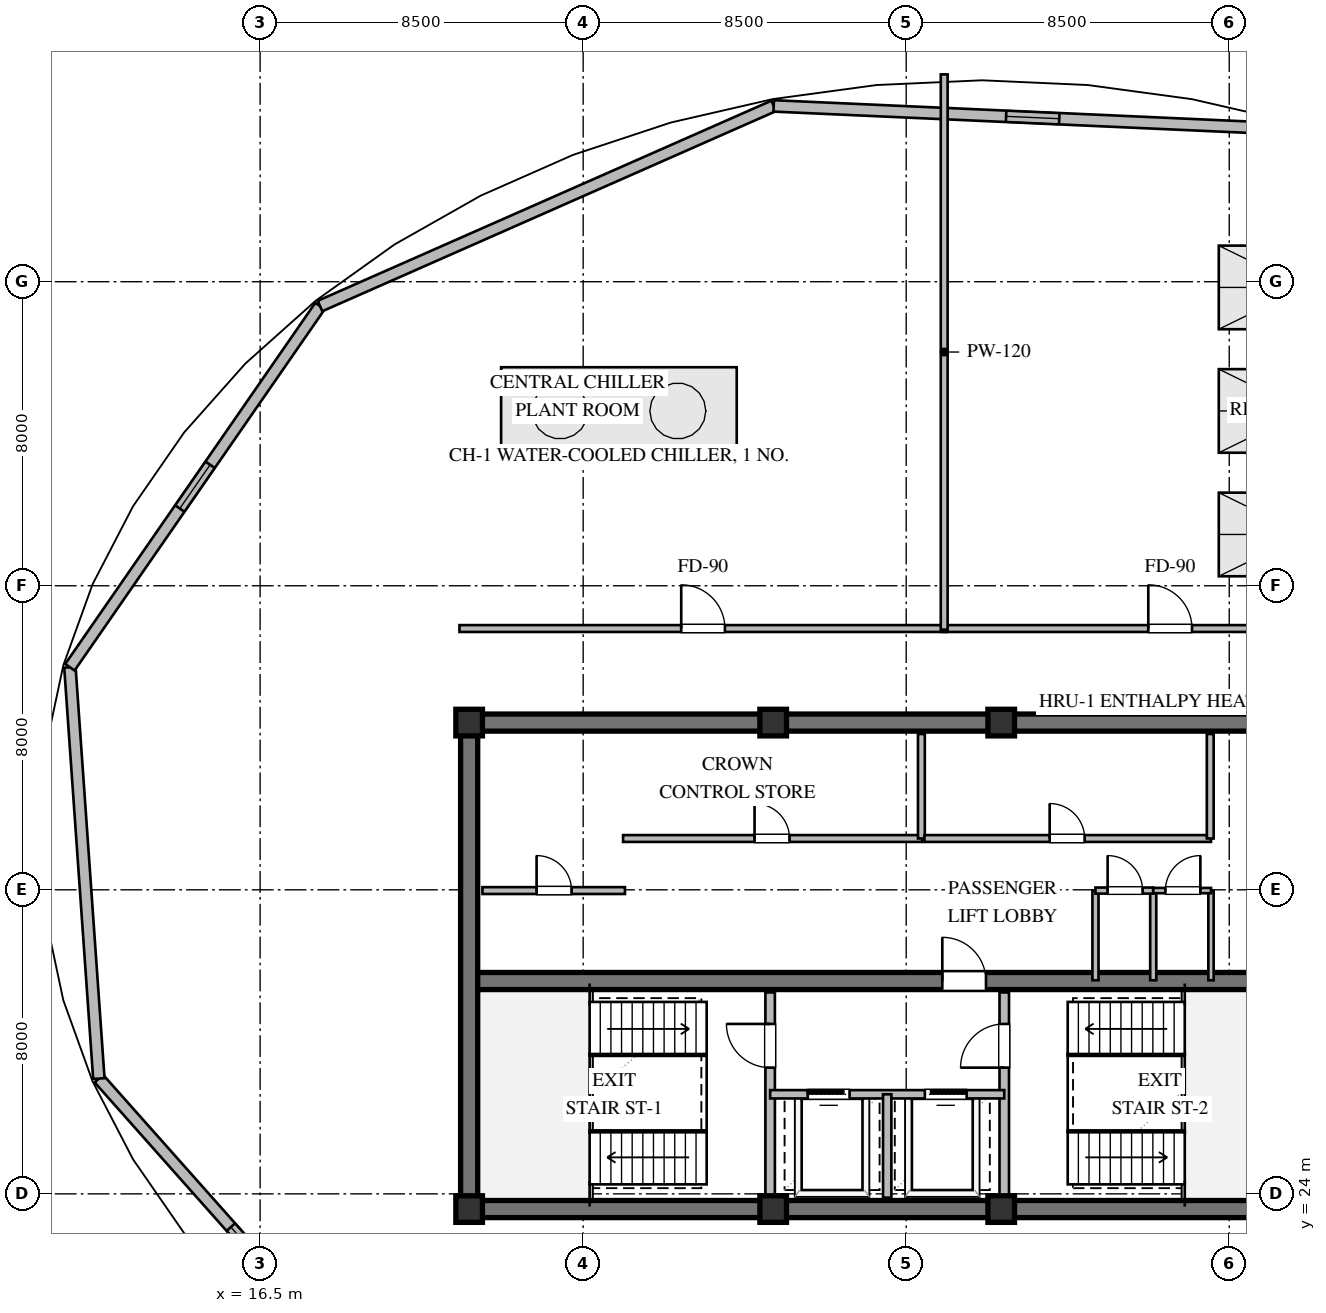
"""IFC4 building model, lengths in metres.
Left out: names, types, materials, properties, quantities, classifications, styles, units other than length and angle.
Written with IfcOpenShell. Run it as: python <this file> out.ifc"""

import sys

from ifc_helpers import new_model, si_unit, direction, frame, frame_2d, origin, origin_2d, place, context, subcontext, project, spatial, rectangle, extrude, element, fill, save


model = new_model("IFC4")
c1 = context("Model", 3, precision=1e-05, world=origin(), true_north=direction((0.0, 1.0)))
c2 = subcontext(c1, "Body", "Model", "MODEL_VIEW")
j1 = project(units=[si_unit("LENGTHUNIT", "METRE"), si_unit("PLANEANGLEUNIT", "RADIAN")], contexts=[c1])
p1 = place(None, origin())
s1 = spatial("IfcSite", under=j1, at=p1, CompositionType="ELEMENT")
p2 = place(p1, origin())
s2 = spatial("IfcBuilding", under=s1, at=p2, CompositionType="ELEMENT")
p3 = place(p2, frame((0.0, 0.0, 300.8)))
s3 = spatial("IfcBuildingStorey", under=s2, at=p3, CompositionType="ELEMENT", Elevation=300.8)
for number, where, z_axis, x_axis in (
    (1, (21.775, 23.6, 0.0), (0.0, 0.0, 1.0), (1.0, 0.0, 0.0)),
    (2, (21.775, 36.4, 0.0), (0.0, 0.0, 1.0), (1.0, 0.0, 0.0)),
):
    element("IfcWall", number, at=place(p3, frame(where, z_axis=z_axis, x_axis=x_axis)), inside=s3, PredefinedType="SHEAR", context=c2, shape_type="SweptSolid", body=[
        extrude(rectangle(XDim=22.45, YDim=0.45, at=frame_2d((11.225, 0.0))), origin(), (0.0, 0.0, 1.0), 3.72),
    ])
p4 = place(p3, frame((22.0, 23.825, 0.0), z_axis=(0.0, 0.0, 1.0), x_axis=(0.0, 1.0, 0.0)))
e3 = element("IfcWall", 3, at=p4, inside=s3, PredefinedType="SHEAR", context=c2, shape_type="SweptSolid", body=[
    extrude(rectangle(XDim=12.35, YDim=0.45, at=frame_2d((6.175, 0.0))), origin(), (0.0, 0.0, 1.0), 3.72),
])
p5 = place(p3, frame((22.225, 29.6, 0.0), z_axis=(0.0, 0.0, 1.0), x_axis=(1.0, 0.0, 0.0)))
e4 = element("IfcWall", 4, at=p5, inside=s3, PredefinedType="SHEAR", context=c2, shape_type="SweptSolid", body=[
    extrude(rectangle(XDim=21.55, YDim=0.45, at=frame_2d((10.775, 0.0))), origin(), (0.0, 0.0, 1.0), 3.72),
])
p6 = place(p5, frame((12.225, 0.0, 0.0)))
e5 = element("IfcOpeningElement", 5, at=p6, cuts=e4, PredefinedType="OPENING", context=c2, shape_type="SweptSolid", body=[
    extrude(rectangle(XDim=1.15, YDim=2.1, at=frame_2d((0.575, 1.05))), frame((0.0, 0.235, 0.0), z_axis=(0.0, -1.0, 0.0), x_axis=(1.0, 0.0, 0.0)), (0.0, 0.0, 1.0), 0.47),
])
for number, where, z_axis, x_axis in (
    (6, (22.0, 23.6, 0.0), (0.0, 0.0, 1.0), (1.0, 0.0, 0.0)),
    (7, (30.0, 23.6, 0.0), (0.0, 0.0, 1.0), (1.0, 0.0, 0.0)),
    (8, (36.0, 23.6, 0.0), (0.0, 0.0, 1.0), (1.0, 0.0, 0.0)),
    (9, (36.0, 36.4, 0.0), (0.0, 0.0, 1.0), (1.0, 0.0, 0.0)),
    (10, (30.0, 36.4, 0.0), (0.0, 0.0, 1.0), (1.0, 0.0, 0.0)),
    (11, (22.0, 36.4, 0.0), (0.0, 0.0, 1.0), (1.0, 0.0, 0.0)),
):
    element("IfcColumn", number, at=place(p3, frame(where, z_axis=z_axis, x_axis=x_axis)), inside=s3, PredefinedType="COLUMN", context=c2, shape_type="SweptSolid", body=[
        extrude(rectangle(XDim=0.7, YDim=0.7, at=origin_2d()), origin(), (0.0, 0.0, 1.0), 4.0),
    ])
p7 = place(p3, frame((20.134, 18.172, 0.0), z_axis=(0.0, 0.0, 1.0), x_axis=(-0.664394513906, 0.747382050822, 0.0)))
e12 = element("IfcWall", 12, at=p7, inside=s3, PredefinedType="STANDARD", context=c2, shape_type="SweptSolid", body=[
    extrude(rectangle(XDim=11.856, YDim=0.3, at=frame_2d((5.928, 0.0))), origin(), (0.0, 0.0, 1.0), 3.72),
])
p8 = place(p7, frame((5.228, 0.0, 1.2)))
e13 = element("IfcOpeningElement", 13, at=p8, cuts=e12, PredefinedType="OPENING", context=c2, shape_type="SweptSolid", body=[
    extrude(rectangle(XDim=1.4, YDim=1.2, at=frame_2d((0.7, 0.6))), frame((0.0, 0.16, 0.0), z_axis=(0.0, -1.0, 0.0), x_axis=(1.0, 0.0, 0.0)), (0.0, 0.0, 1.0), 0.32),
])
p9 = place(p3, frame((12.257, 27.033, 0.0), z_axis=(0.0, 0.0, 1.0), x_axis=(-0.070228374331, 0.99753093959, 0.0)))
e14 = element("IfcWall", 14, at=p9, inside=s3, PredefinedType="STANDARD", context=c2, shape_type="SweptSolid", body=[
    extrude(rectangle(XDim=10.85, YDim=0.3, at=frame_2d((5.425, 0.0))), origin(), (0.0, 0.0, 1.0), 3.72),
])
p10 = place(p3, frame((11.495, 37.856, 0.0), z_axis=(0.0, 0.0, 1.0), x_axis=(0.569269280193, 0.822151133691, 0.0)))
e15 = element("IfcWall", 15, at=p10, inside=s3, PredefinedType="STANDARD", context=c2, shape_type="SweptSolid", body=[
    extrude(rectangle(XDim=11.56, YDim=0.3, at=frame_2d((5.78, 0.0))), origin(), (0.0, 0.0, 1.0), 3.72),
])
p11 = place(p10, frame((5.08, 0.0, 1.2)))
e16 = element("IfcOpeningElement", 16, at=p11, cuts=e15, PredefinedType="OPENING", context=c2, shape_type="SweptSolid", body=[
    extrude(rectangle(XDim=1.4, YDim=1.2, at=frame_2d((0.7, 0.6))), frame((0.0, 0.16, 0.0), z_axis=(0.0, -1.0, 0.0), x_axis=(1.0, 0.0, 0.0)), (0.0, 0.0, 1.0), 0.32),
])
p12 = place(p3, frame((18.076, 47.36, 0.0), z_axis=(0.0, 0.0, 1.0), x_axis=(0.914943001047, 0.40358308294, 0.0)))
e17 = element("IfcWall", 17, at=p12, inside=s3, PredefinedType="STANDARD", context=c2, shape_type="SweptSolid", body=[
    extrude(rectangle(XDim=13.048, YDim=0.3, at=frame_2d((6.524, 0.0))), origin(), (0.0, 0.0, 1.0), 3.72),
])
p13 = place(p3, frame((30.014, 52.626, 0.0), z_axis=(0.0, 0.0, 1.0), x_axis=(0.998996211569, -0.04479474602, 0.0)))
e18 = element("IfcWall", 18, at=p13, inside=s3, PredefinedType="STANDARD", context=c2, shape_type="SweptSolid", body=[
    extrude(rectangle(XDim=13.642, YDim=0.3, at=frame_2d((6.821, 0.0))), origin(), (0.0, 0.0, 1.0), 3.72),
])
p14 = place(p13, frame((6.121, 0.0, 1.2)))
e19 = element("IfcOpeningElement", 19, at=p14, cuts=e18, PredefinedType="OPENING", context=c2, shape_type="SweptSolid", body=[
    extrude(rectangle(XDim=1.4, YDim=1.2, at=frame_2d((0.7, 0.6))), frame((0.0, 0.16, 0.0), z_axis=(0.0, -1.0, 0.0), x_axis=(1.0, 0.0, 0.0)), (0.0, 0.0, 1.0), 0.32),
])
p15 = place(p3, frame((29.92, 23.9, 0.0), z_axis=(0.0, 0.0, 1.0), x_axis=(0.0, 1.0, 0.0)))
e20 = element("IfcWall", 20, at=p15, inside=s3, PredefinedType="SOLIDWALL", context=c2, shape_type="SweptSolid", body=[
    extrude(rectangle(XDim=5.4, YDim=0.25, at=frame_2d((2.7, 0.0))), origin(), (0.0, 0.0, 1.0), 3.72),
])
p16 = place(p15, frame((3.421, 0.0, 0.0)))
e21 = element("IfcOpeningElement", 21, at=p16, cuts=e20, PredefinedType="OPENING", context=c2, shape_type="SweptSolid", body=[
    extrude(rectangle(XDim=1.15, YDim=2.1, at=frame_2d((0.575, 1.05))), frame((0.0, 0.135, 0.0), z_axis=(0.0, -1.0, 0.0), x_axis=(1.0, 0.0, 0.0)), (0.0, 0.0, 1.0), 0.27),
])
p17 = place(p3, frame((36.08, 23.9, 0.0), z_axis=(0.0, 0.0, 1.0), x_axis=(0.0, 1.0, 0.0)))
e22 = element("IfcWall", 22, at=p17, inside=s3, PredefinedType="SOLIDWALL", context=c2, shape_type="SweptSolid", body=[
    extrude(rectangle(XDim=5.4, YDim=0.25, at=frame_2d((2.7, 0.0))), origin(), (0.0, 0.0, 1.0), 3.72),
])
p18 = place(p17, frame((3.421, 0.0, 0.0)))
e23 = element("IfcOpeningElement", 23, at=p18, cuts=e22, PredefinedType="OPENING", context=c2, shape_type="SweptSolid", body=[
    extrude(rectangle(XDim=1.15, YDim=2.1, at=frame_2d((0.575, 1.05))), frame((0.0, 0.135, 0.0), z_axis=(0.0, -1.0, 0.0), x_axis=(1.0, 0.0, 0.0)), (0.0, 0.0, 1.0), 0.27),
])
p19 = place(p3, frame((29.92, 26.62, 0.0), z_axis=(0.0, 0.0, 1.0), x_axis=(1.0, 0.0, 0.0)))
e24 = element("IfcWall", 24, at=p19, inside=s3, PredefinedType="SOLIDWALL", context=c2, shape_type="SweptSolid", body=[
    extrude(rectangle(XDim=6.16, YDim=0.22, at=frame_2d((3.08, 0.0))), origin(), (0.0, 0.0, 1.0), 3.72),
])
p20 = place(p19, frame((0.99, 0.0, 0.0)))
e25 = element("IfcOpeningElement", 25, at=p20, cuts=e24, PredefinedType="OPENING", context=c2, shape_type="SweptSolid", body=[
    extrude(rectangle(XDim=1.1, YDim=2.1, at=frame_2d((0.55, 1.05))), frame((0.0, 0.12, 0.0), z_axis=(0.0, -1.0, 0.0), x_axis=(1.0, 0.0, 0.0)), (0.0, 0.0, 1.0), 0.24),
])
p21 = place(p19, frame((4.07, 0.0, 0.0)))
e26 = element("IfcOpeningElement", 26, at=p21, cuts=e24, PredefinedType="OPENING", context=c2, shape_type="SweptSolid", body=[
    extrude(rectangle(XDim=1.1, YDim=2.1, at=frame_2d((0.55, 1.05))), frame((0.0, 0.12, 0.0), z_axis=(0.0, -1.0, 0.0), x_axis=(1.0, 0.0, 0.0)), (0.0, 0.0, 1.0), 0.24),
])
p22 = place(p3, frame((33.0, 23.9, 0.0), z_axis=(0.0, 0.0, 1.0), x_axis=(0.0, 1.0, 0.0)))
e27 = element("IfcWall", 27, at=p22, inside=s3, PredefinedType="SOLIDWALL", context=c2, shape_type="SweptSolid", body=[
    extrude(rectangle(XDim=2.72, YDim=0.22, at=frame_2d((1.36, 0.0))), origin(), (0.0, 0.0, 1.0), 3.72),
])
p23 = place(p3, frame((26.05, 33.35, 0.0), z_axis=(0.0, 0.0, 1.0), x_axis=(1.0, 0.0, 0.0)))
e28 = element("IfcWall", 28, at=p23, inside=s3, PredefinedType="PARTITIONING", context=c2, shape_type="SweptSolid", body=[
    extrude(rectangle(XDim=7.87, YDim=0.18, at=frame_2d((3.935, 0.0))), origin(), (0.0, 0.0, 1.0), 3.72),
])
p24 = place(p23, frame((3.46, 0.0, 0.0)))
e29 = element("IfcOpeningElement", 29, at=p24, cuts=e28, PredefinedType="OPENING", context=c2, shape_type="SweptSolid", body=[
    extrude(rectangle(XDim=0.92, YDim=2.1, at=frame_2d((0.46, 1.05))), frame((0.0, 0.1, 0.0), z_axis=(0.0, -1.0, 0.0), x_axis=(1.0, 0.0, 0.0)), (0.0, 0.0, 1.0), 0.2),
])
p25 = place(p3, frame((33.9, 33.35, 0.0), z_axis=(0.0, 0.0, 1.0), x_axis=(0.0, 1.0, 0.0)))
e30 = element("IfcWall", 30, at=p25, inside=s3, PredefinedType="PARTITIONING", context=c2, shape_type="SweptSolid", body=[
    extrude(rectangle(XDim=2.75, YDim=0.18, at=frame_2d((1.375, 0.0))), origin(), (0.0, 0.0, 1.0), 3.72),
])
p26 = place(p3, frame((33.98, 33.35, 0.0), z_axis=(0.0, 0.0, 1.0), x_axis=(1.0, 0.0, 0.0)))
e31 = element("IfcWall", 31, at=p26, inside=s3, PredefinedType="PARTITIONING", context=c2, shape_type="SweptSolid", body=[
    extrude(rectangle(XDim=7.54, YDim=0.18, at=frame_2d((3.77, 0.0))), origin(), (0.0, 0.0, 1.0), 3.72),
])
p27 = place(p26, frame((3.295, 0.0, 0.0)))
e32 = element("IfcOpeningElement", 32, at=p27, cuts=e31, PredefinedType="OPENING", context=c2, shape_type="SweptSolid", body=[
    extrude(rectangle(XDim=0.92, YDim=2.1, at=frame_2d((0.46, 1.05))), frame((0.0, 0.1, 0.0), z_axis=(0.0, -1.0, 0.0), x_axis=(1.0, 0.0, 0.0)), (0.0, 0.0, 1.0), 0.2),
])
p28 = place(p3, frame((41.5, 33.35, 0.0), z_axis=(0.0, 0.0, 1.0), x_axis=(0.0, 1.0, 0.0)))
e33 = element("IfcWall", 33, at=p28, inside=s3, PredefinedType="PARTITIONING", context=c2, shape_type="SweptSolid", body=[
    extrude(rectangle(XDim=2.75, YDim=0.18, at=frame_2d((1.375, 0.0))), origin(), (0.0, 0.0, 1.0), 3.72),
])
p29 = place(p3, frame((22.35, 31.98, 0.0), z_axis=(0.0, 0.0, 1.0), x_axis=(1.0, 0.0, 0.0)))
e34 = element("IfcWall", 34, at=p29, inside=s3, PredefinedType="PARTITIONING", context=c2, shape_type="SweptSolid", body=[
    extrude(rectangle(XDim=3.75, YDim=0.18, at=frame_2d((1.875, 0.0))), origin(), (0.0, 0.0, 1.0), 3.72),
])
p30 = place(p29, frame((1.425, 0.0, 0.0)))
e35 = element("IfcOpeningElement", 35, at=p30, cuts=e34, PredefinedType="OPENING", context=c2, shape_type="SweptSolid", body=[
    extrude(rectangle(XDim=0.92, YDim=2.1, at=frame_2d((0.46, 1.05))), frame((0.0, 0.1, 0.0), z_axis=(0.0, -1.0, 0.0), x_axis=(1.0, 0.0, 0.0)), (0.0, 0.0, 1.0), 0.2),
])
for number, where, z_axis, x_axis in (
    (36, (38.48, 29.62, 0.0), (0.0, 0.0, 1.0), (0.0, 1.0, 0.0)),
    (37, (40.0, 29.62, 0.0), (0.0, 0.0, 1.0), (0.0, 1.0, 0.0)),
):
    element("IfcWall", number, at=place(p3, frame(where, z_axis=z_axis, x_axis=x_axis)), inside=s3, PredefinedType="PLUMBINGWALL", context=c2, shape_type="SweptSolid", body=[
        extrude(rectangle(XDim=2.36, YDim=0.16, at=frame_2d((1.18, 0.0))), origin(), (0.0, 0.0, 1.0), 3.72),
    ])
p31 = place(p3, frame((41.52, 29.62, 0.0), z_axis=(0.0, 0.0, 1.0), x_axis=(0.0, 1.0, 0.0)))
e38 = element("IfcWall", 38, at=p31, inside=s3, PredefinedType="PARTITIONING", context=c2, shape_type="SweptSolid", body=[
    extrude(rectangle(XDim=2.36, YDim=0.14, at=frame_2d((1.18, 0.0))), origin(), (0.0, 0.0, 1.0), 3.72),
])
p32 = place(p3, frame((38.48, 31.98, 0.0), z_axis=(0.0, 0.0, 1.0), x_axis=(1.0, 0.0, 0.0)))
e39 = element("IfcWall", 39, at=p32, inside=s3, PredefinedType="PLUMBINGWALL", context=c2, shape_type="SweptSolid", body=[
    extrude(rectangle(XDim=1.52, YDim=0.16, at=frame_2d((0.76, 0.0))), origin(), (0.0, 0.0, 1.0), 3.72),
])
p33 = place(p32, frame((0.32, 0.0, 0.0)))
e40 = element("IfcOpeningElement", 40, at=p33, cuts=e39, PredefinedType="OPENING", context=c2, shape_type="SweptSolid", body=[
    extrude(rectangle(XDim=0.92, YDim=2.1, at=frame_2d((0.46, 1.05))), frame((0.0, 0.09, 0.0), z_axis=(0.0, -1.0, 0.0), x_axis=(1.0, 0.0, 0.0)), (0.0, 0.0, 1.0), 0.18),
])
p34 = place(p3, frame((40.0, 31.98, 0.0), z_axis=(0.0, 0.0, 1.0), x_axis=(1.0, 0.0, 0.0)))
e41 = element("IfcWall", 41, at=p34, inside=s3, PredefinedType="PARTITIONING", context=c2, shape_type="SweptSolid", body=[
    extrude(rectangle(XDim=1.52, YDim=0.14, at=frame_2d((0.76, 0.0))), origin(), (0.0, 0.0, 1.0), 3.72),
])
p35 = place(p34, frame((0.32, 0.0, 0.0)))
e42 = element("IfcOpeningElement", 42, at=p35, cuts=e41, PredefinedType="OPENING", context=c2, shape_type="SweptSolid", body=[
    extrude(rectangle(XDim=0.92, YDim=2.1, at=frame_2d((0.46, 1.05))), frame((0.0, 0.08, 0.0), z_axis=(0.0, -1.0, 0.0), x_axis=(1.0, 0.0, 0.0)), (0.0, 0.0, 1.0), 0.16),
])
p36 = place(p3, frame((21.745, 38.875, 0.0), z_axis=(0.0, 0.0, 1.0), x_axis=(1.0, 0.0, 0.0)))
e43 = element("IfcWall", 43, at=p36, inside=s3, PredefinedType="PARTITIONING", context=c2, shape_type="SweptSolid", body=[
    extrude(rectangle(XDim=12.82, YDim=0.18, at=frame_2d((6.41, 0.0))), origin(), (0.0, 0.0, 1.0), 3.72),
])
p37 = place(p36, frame((5.835, 0.0, 0.0)))
e44 = element("IfcOpeningElement", 44, at=p37, cuts=e43, PredefinedType="OPENING", context=c2, shape_type="SweptSolid", body=[
    extrude(rectangle(XDim=1.15, YDim=2.1, at=frame_2d((0.575, 1.05))), frame((0.0, 0.1, 0.0), z_axis=(0.0, -1.0, 0.0), x_axis=(1.0, 0.0, 0.0)), (0.0, 0.0, 1.0), 0.2),
])
p38 = place(p3, frame((34.435, 38.875, 0.0), z_axis=(0.0, 0.0, 1.0), x_axis=(1.0, 0.0, 0.0)))
e45 = element("IfcWall", 45, at=p38, inside=s3, PredefinedType="PARTITIONING", context=c2, shape_type="SweptSolid", body=[
    extrude(rectangle(XDim=12.02, YDim=0.18, at=frame_2d((6.01, 0.0))), origin(), (0.0, 0.0, 1.0), 3.72),
])
p39 = place(p38, frame((5.435, 0.0, 0.0)))
e46 = element("IfcOpeningElement", 46, at=p39, cuts=e45, PredefinedType="OPENING", context=c2, shape_type="SweptSolid", body=[
    extrude(rectangle(XDim=1.15, YDim=2.1, at=frame_2d((0.575, 1.05))), frame((0.0, 0.1, 0.0), z_axis=(0.0, -1.0, 0.0), x_axis=(1.0, 0.0, 0.0)), (0.0, 0.0, 1.0), 0.2),
])
p40 = place(p3, frame((34.5, 53.455, 0.0), z_axis=(0.0, 0.0, 1.0), x_axis=(0.0, -1.0, 0.0)))
e47 = element("IfcWall", 47, at=p40, inside=s3, PredefinedType="PARTITIONING", context=c2, shape_type="SweptSolid", body=[
    extrude(rectangle(XDim=14.61, YDim=0.18, at=frame_2d((7.305, 0.0))), origin(), (0.0, 0.0, 1.0), 3.72),
])
p41 = place(p8, origin())
e48 = element("IfcWindow", 48, at=p41, inside=s3, PartitioningType="SINGLE_PANEL", PredefinedType="WINDOW", context=c2, shape_type="SweptSolid", body=[
    extrude(rectangle(XDim=1.4, YDim=1.2, at=frame_2d((0.7, 0.6))), frame((0.0, 0.03, 0.0), z_axis=(0.0, -1.0, 0.0), x_axis=(1.0, 0.0, 0.0)), (0.0, 0.0, 1.0), 0.06),
])
fill(e13, e48)
p42 = place(p11, origin())
e49 = element("IfcWindow", 49, at=p42, inside=s3, PartitioningType="SINGLE_PANEL", PredefinedType="WINDOW", context=c2, shape_type="SweptSolid", body=[
    extrude(rectangle(XDim=1.4, YDim=1.2, at=frame_2d((0.7, 0.6))), frame((0.0, 0.03, 0.0), z_axis=(0.0, -1.0, 0.0), x_axis=(1.0, 0.0, 0.0)), (0.0, 0.0, 1.0), 0.06),
])
fill(e16, e49)
p43 = place(p14, origin())
e50 = element("IfcWindow", 50, at=p43, inside=s3, PartitioningType="SINGLE_PANEL", PredefinedType="WINDOW", context=c2, shape_type="SweptSolid", body=[
    extrude(rectangle(XDim=1.4, YDim=1.2, at=frame_2d((0.7, 0.6))), frame((0.0, 0.03, 0.0), z_axis=(0.0, -1.0, 0.0), x_axis=(1.0, 0.0, 0.0)), (0.0, 0.0, 1.0), 0.06),
])
fill(e19, e50)
p44 = place(p16, origin())
e51 = element("IfcDoor", 51, at=p44, inside=s3, OperationType="SINGLE_SWING_RIGHT", PredefinedType="DOOR", context=c2, shape_type="SweptSolid", body=[
    extrude(rectangle(XDim=1.15, YDim=2.1, at=frame_2d((0.575, 1.05))), frame((0.0, 0.025, 0.0), z_axis=(0.0, -1.0, 0.0), x_axis=(1.0, 0.0, 0.0)), (0.0, 0.0, 1.0), 0.05),
])
fill(e21, e51)
p45 = place(p18, origin())
e52 = element("IfcDoor", 52, at=p45, inside=s3, OperationType="SINGLE_SWING_LEFT", PredefinedType="DOOR", context=c2, shape_type="SweptSolid", body=[
    extrude(rectangle(XDim=1.15, YDim=2.1, at=frame_2d((0.575, 1.05))), frame((0.0, 0.025, 0.0), z_axis=(0.0, -1.0, 0.0), x_axis=(1.0, 0.0, 0.0)), (0.0, 0.0, 1.0), 0.05),
])
fill(e23, e52)
p46 = place(p20, origin())
e53 = element("IfcDoor", 53, at=p46, inside=s3, OperationType="SLIDING_TO_LEFT", PredefinedType="DOOR", context=c2, shape_type="SweptSolid", body=[
    extrude(rectangle(XDim=1.1, YDim=2.1, at=frame_2d((0.55, 1.05))), frame((0.0, 0.025, 0.0), z_axis=(0.0, -1.0, 0.0), x_axis=(1.0, 0.0, 0.0)), (0.0, 0.0, 1.0), 0.05),
])
fill(e25, e53)
p47 = place(p21, origin())
e54 = element("IfcDoor", 54, at=p47, inside=s3, OperationType="SLIDING_TO_RIGHT", PredefinedType="DOOR", context=c2, shape_type="SweptSolid", body=[
    extrude(rectangle(XDim=1.1, YDim=2.1, at=frame_2d((0.55, 1.05))), frame((0.0, 0.025, 0.0), z_axis=(0.0, -1.0, 0.0), x_axis=(1.0, 0.0, 0.0)), (0.0, 0.0, 1.0), 0.05),
])
fill(e26, e54)
p48 = place(p6, origin())
e55 = element("IfcDoor", 55, at=p48, inside=s3, OperationType="SINGLE_SWING_LEFT", PredefinedType="DOOR", context=c2, shape_type="SweptSolid", body=[
    extrude(rectangle(XDim=1.15, YDim=2.1, at=frame_2d((0.575, 1.05))), frame((0.0, 0.025, 0.0), z_axis=(0.0, -1.0, 0.0), x_axis=(1.0, 0.0, 0.0)), (0.0, 0.0, 1.0), 0.05),
])
fill(e5, e55)
p49 = place(p24, origin())
e56 = element("IfcDoor", 56, at=p49, inside=s3, OperationType="SINGLE_SWING_LEFT", PredefinedType="DOOR", context=c2, shape_type="SweptSolid", body=[
    extrude(rectangle(XDim=0.92, YDim=2.1, at=frame_2d((0.46, 1.05))), frame((0.0, 0.025, 0.0), z_axis=(0.0, -1.0, 0.0), x_axis=(1.0, 0.0, 0.0)), (0.0, 0.0, 1.0), 0.05),
])
fill(e29, e56)
p50 = place(p27, origin())
e57 = element("IfcDoor", 57, at=p50, inside=s3, OperationType="SINGLE_SWING_LEFT", PredefinedType="DOOR", context=c2, shape_type="SweptSolid", body=[
    extrude(rectangle(XDim=0.92, YDim=2.1, at=frame_2d((0.46, 1.05))), frame((0.0, 0.025, 0.0), z_axis=(0.0, -1.0, 0.0), x_axis=(1.0, 0.0, 0.0)), (0.0, 0.0, 1.0), 0.05),
])
fill(e32, e57)
p51 = place(p30, origin())
e58 = element("IfcDoor", 58, at=p51, inside=s3, OperationType="SINGLE_SWING_LEFT", PredefinedType="DOOR", context=c2, shape_type="SweptSolid", body=[
    extrude(rectangle(XDim=0.92, YDim=2.1, at=frame_2d((0.46, 1.05))), frame((0.0, 0.025, 0.0), z_axis=(0.0, -1.0, 0.0), x_axis=(1.0, 0.0, 0.0)), (0.0, 0.0, 1.0), 0.05),
])
fill(e35, e58)
p52 = place(p33, origin())
e59 = element("IfcDoor", 59, at=p52, inside=s3, OperationType="SINGLE_SWING_LEFT", PredefinedType="DOOR", context=c2, shape_type="SweptSolid", body=[
    extrude(rectangle(XDim=0.92, YDim=2.1, at=frame_2d((0.46, 1.05))), frame((0.0, 0.025, 0.0), z_axis=(0.0, -1.0, 0.0), x_axis=(1.0, 0.0, 0.0)), (0.0, 0.0, 1.0), 0.05),
])
fill(e40, e59)
p53 = place(p35, origin())
e60 = element("IfcDoor", 60, at=p53, inside=s3, OperationType="SINGLE_SWING_RIGHT", PredefinedType="DOOR", context=c2, shape_type="SweptSolid", body=[
    extrude(rectangle(XDim=0.92, YDim=2.1, at=frame_2d((0.46, 1.05))), frame((0.0, 0.025, 0.0), z_axis=(0.0, -1.0, 0.0), x_axis=(1.0, 0.0, 0.0)), (0.0, 0.0, 1.0), 0.05),
])
fill(e42, e60)
p54 = place(p37, origin())
e61 = element("IfcDoor", 61, at=p54, inside=s3, OperationType="SINGLE_SWING_LEFT", PredefinedType="DOOR", context=c2, shape_type="SweptSolid", body=[
    extrude(rectangle(XDim=1.15, YDim=2.1, at=frame_2d((0.575, 1.05))), frame((0.0, 0.025, 0.0), z_axis=(0.0, -1.0, 0.0), x_axis=(1.0, 0.0, 0.0)), (0.0, 0.0, 1.0), 0.05),
])
fill(e44, e61)
p55 = place(p39, origin())
e62 = element("IfcDoor", 62, at=p55, inside=s3, OperationType="SINGLE_SWING_LEFT", PredefinedType="DOOR", context=c2, shape_type="SweptSolid", body=[
    extrude(rectangle(XDim=1.15, YDim=2.1, at=frame_2d((0.575, 1.05))), frame((0.0, 0.025, 0.0), z_axis=(0.0, -1.0, 0.0), x_axis=(1.0, 0.0, 0.0)), (0.0, 0.0, 1.0), 0.05),
])
fill(e46, e62)
save(model, sys.argv[1])
